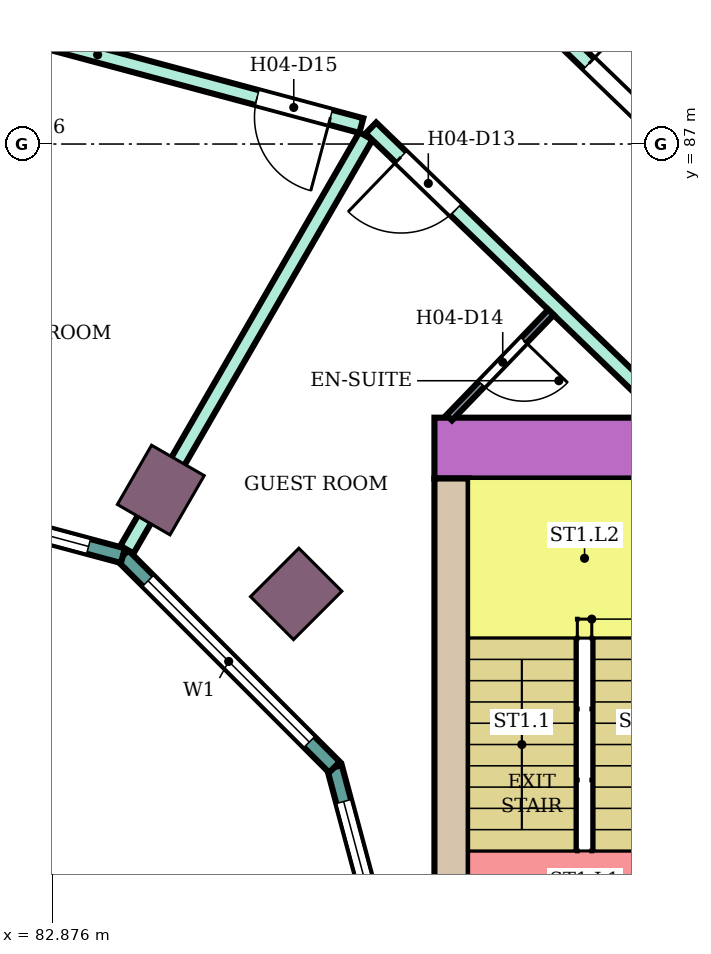
"""IFC4 building model, lengths in metres.
Left out: names, types, materials, properties, quantities, classifications, styles, units other than length and angle.
Written with IfcOpenShell. Run it as: python <this file> out.ifc"""

import sys

from ifc_helpers import new_model, si_unit, direction, frame, frame_2d, origin, origin_2d, place, context, subcontext, project, spatial, rectangle, extrude, element, fill, save


model = new_model("IFC4")
c1 = context("Model", 3, precision=1e-05, world=origin(), true_north=direction((0.0, 1.0)))
c2 = subcontext(c1, "Body", "Model", "MODEL_VIEW")
j1 = project(units=[si_unit("LENGTHUNIT", "METRE"), si_unit("PLANEANGLEUNIT", "RADIAN")], contexts=[c1])
p1 = place(None, origin())
s1 = spatial("IfcSite", under=j1, at=p1, CompositionType="ELEMENT")
p2 = place(p1, origin())
s2 = spatial("IfcBuilding", under=s1, at=p2, CompositionType="ELEMENT")
p3 = place(p2, frame((0.0, 0.0, 66.8)))
s3 = spatial("IfcBuildingStorey", under=s2, at=p3, CompositionType="ELEMENT", Elevation=66.8)
for number, where, z_axis, x_axis in (
    (1, (86.081, 81.081, 0.0), (0.0, 0.0, 1.0), (0.707, 0.707, 0.0)),
    (2, (84.3, 82.448, 0.0), (0.0, 0.0, 1.0), (0.5, 0.866, 0.0)),
):
    element("IfcColumn", number, at=place(p3, frame(where, z_axis=z_axis, x_axis=x_axis)), inside=s3, PredefinedType="COLUMN", context=c2, shape_type="SweptSolid", body=[
        extrude(rectangle(XDim=0.9, YDim=0.8, at=origin_2d()), origin(), (0.0, 0.0, 1.0), 3.8),
    ])
p4 = place(p3, frame((87.9, 83.0, 0.0), z_axis=(0.0, 0.0, 1.0), x_axis=(1.0, 0.0, 0.0)))
e3 = element("IfcWall", 3, at=p4, inside=s3, PredefinedType="SHEAR", context=c2, shape_type="SweptSolid", body=[
    extrude(rectangle(XDim=14.7, YDim=0.8, at=frame_2d((7.35, 0.0))), origin(), (0.0, 0.0, 1.0), 3.48),
])
p5 = place(p4, frame((4.2, 0.0, 0.0)))
e4 = element("IfcOpeningElement", 4, at=p5, cuts=e3, PredefinedType="OPENING", context=c2, shape_type="SweptSolid", body=[
    extrude(rectangle(XDim=2.4, YDim=2.4, at=frame_2d((1.2, 1.2))), frame((0.0, 0.41, 0.0), z_axis=(0.0, -1.0, 0.0), x_axis=(1.0, 0.0, 0.0)), (0.0, 0.0, 1.0), 0.82),
])
p6 = place(p3, frame((88.125, 75.0, 0.0), z_axis=(0.0, 0.0, 1.0), x_axis=(0.0, 1.0, 0.0)))
e5 = element("IfcWall", 5, at=p6, inside=s3, PredefinedType="SHEAR", context=c2, shape_type="SweptSolid", body=[
    extrude(rectangle(XDim=7.6, YDim=0.45, at=frame_2d((3.8, 0.0))), origin(), (0.0, 0.0, 1.0), 3.48),
])
p7 = place(p3, frame((87.604, 75.0, 0.0), z_axis=(0.0, 0.0, 1.0), x_axis=(-0.258789828301, 0.965933654434, 0.0)))
e6 = element("IfcWall", 6, at=p7, inside=s3, PredefinedType="NOTDEFINED", context=c2, shape_type="SweptSolid", body=[
    extrude(rectangle(XDim=3.936, YDim=0.2, at=frame_2d((1.968, 0.0))), origin(), (0.0, 0.0, 1.0), 3.8),
])
p8 = place(p7, frame((0.468, 0.0, 0.9)))
e7 = element("IfcOpeningElement", 7, at=p8, cuts=e6, PredefinedType="OPENING", context=c2, shape_type="SweptSolid", body=[
    extrude(rectangle(XDim=3.0, YDim=2.3, at=frame_2d((1.5, 1.15))), frame((0.0, 0.11, 0.0), z_axis=(0.0, -1.0, 0.0), x_axis=(1.0, 0.0, 0.0)), (0.0, 0.0, 1.0), 0.22),
])
p9 = place(p3, frame((86.585, 78.802, 0.0), z_axis=(0.0, 0.0, 1.0), x_axis=(-0.707106781187, 0.707106781187, 0.0)))
e8 = element("IfcWall", 8, at=p9, inside=s3, PredefinedType="NOTDEFINED", context=c2, shape_type="SweptSolid", body=[
    extrude(rectangle(XDim=3.936, YDim=0.2, at=frame_2d((1.968, 0.0))), origin(), (0.0, 0.0, 1.0), 3.8),
])
p10 = place(p9, frame((0.468, 0.0, 0.9)))
e9 = element("IfcOpeningElement", 9, at=p10, cuts=e8, PredefinedType="OPENING", context=c2, shape_type="SweptSolid", body=[
    extrude(rectangle(XDim=3.0, YDim=2.3, at=frame_2d((1.5, 1.15))), frame((0.0, 0.11, 0.0), z_axis=(0.0, -1.0, 0.0), x_axis=(1.0, 0.0, 0.0)), (0.0, 0.0, 1.0), 0.22),
])
p11 = place(p3, frame((83.802, 81.585, 0.0), z_axis=(0.0, 0.0, 1.0), x_axis=(-0.965933654434, 0.258789828301, 0.0)))
e10 = element("IfcWall", 10, at=p11, inside=s3, PredefinedType="NOTDEFINED", context=c2, shape_type="SweptSolid", body=[
    extrude(rectangle(XDim=3.936, YDim=0.2, at=frame_2d((1.968, 0.0))), origin(), (0.0, 0.0, 1.0), 3.8),
])
p12 = place(p11, frame((0.468, 0.0, 0.9)))
e11 = element("IfcOpeningElement", 11, at=p12, cuts=e10, PredefinedType="OPENING", context=c2, shape_type="SweptSolid", body=[
    extrude(rectangle(XDim=3.0, YDim=2.3, at=frame_2d((1.5, 1.15))), frame((0.0, 0.11, 0.0), z_axis=(0.0, -1.0, 0.0), x_axis=(1.0, 0.0, 0.0)), (0.0, 0.0, 1.0), 0.22),
])
p13 = place(p3, frame((80.0, 89.104, 0.0), z_axis=(0.0, 0.0, 1.0), x_axis=(0.965854247166, -0.25908603442, 0.0)))
e12 = element("IfcWall", 12, at=p13, inside=s3, PredefinedType="PARTITIONING", context=c2, shape_type="SweptSolid", body=[
    extrude(rectangle(XDim=7.183, YDim=0.2, at=frame_2d((3.592, 0.0))), origin(), (0.0, 0.0, 1.0), 3.35),
])
p14 = place(p13, frame((5.763, 0.0, 0.0)))
e13 = element("IfcOpeningElement", 13, at=p14, cuts=e12, PredefinedType="OPENING", context=c2, shape_type="SweptSolid", body=[
    extrude(rectangle(XDim=1.0, YDim=2.1, at=frame_2d((0.5, 1.05))), frame((0.0, 0.11, 0.0), z_axis=(0.0, -1.0, 0.0), x_axis=(1.0, 0.0, 0.0)), (0.0, 0.0, 1.0), 0.22),
])
p15 = place(p3, frame((83.854, 81.664, 0.0), z_axis=(0.0, 0.0, 1.0), x_axis=(0.500224530691, 0.865895732115, 0.0)))
e14 = element("IfcWall", 14, at=p15, inside=s3, PredefinedType="PARTITIONING", context=c2, shape_type="SweptSolid", body=[
    extrude(rectangle(XDim=6.285, YDim=0.2, at=frame_2d((3.143, 0.0))), origin(), (0.0, 0.0, 1.0), 3.35),
])
p16 = place(p3, frame((87.064, 87.211, 0.0), z_axis=(0.0, 0.0, 1.0), x_axis=(0.719540958932, -0.694450004262, 0.0)))
e15 = element("IfcWall", 15, at=p16, inside=s3, PredefinedType="PARTITIONING", context=c2, shape_type="SweptSolid", body=[
    extrude(rectangle(XDim=5.488, YDim=0.2, at=frame_2d((2.744, 0.0))), origin(), (0.0, 0.0, 1.0), 3.35),
])
p17 = place(p16, frame((0.55, 0.0, 0.0)))
e16 = element("IfcOpeningElement", 16, at=p17, cuts=e15, PredefinedType="OPENING", context=c2, shape_type="SweptSolid", body=[
    extrude(rectangle(XDim=1.0, YDim=2.1, at=frame_2d((0.5, 1.05))), frame((0.0, 0.11, 0.0), z_axis=(0.0, -1.0, 0.0), x_axis=(1.0, 0.0, 0.0)), (0.0, 0.0, 1.0), 0.22),
])
p18 = place(p3, frame((88.386, 89.549, 0.0), z_axis=(0.0, 0.0, 1.0), x_axis=(0.719560576741, -0.694429677073, 0.0)))
e17 = element("IfcWall", 17, at=p18, inside=s3, PredefinedType="PARTITIONING", context=c2, shape_type="SweptSolid", body=[
    extrude(rectangle(XDim=6.635, YDim=0.2, at=frame_2d((3.318, 0.0))), origin(), (0.0, 0.0, 1.0), 3.35),
])
p19 = place(p18, frame((2.147, 0.0, 0.0)))
e18 = element("IfcOpeningElement", 18, at=p19, cuts=e17, PredefinedType="OPENING", context=c2, shape_type="SweptSolid", body=[
    extrude(rectangle(XDim=1.8, YDim=2.1, at=frame_2d((0.9, 1.05))), frame((0.0, 0.11, 0.0), z_axis=(0.0, -1.0, 0.0), x_axis=(1.0, 0.0, 0.0)), (0.0, 0.0, 1.0), 0.22),
])
p20 = place(p3, frame((88.095, 83.4, 0.0), z_axis=(0.0, 0.0, 1.0), x_axis=(0.694447472534, 0.719543402368, 0.0)))
e19 = element("IfcWall", 19, at=p20, inside=s3, PredefinedType="PARTITIONING", context=c2, shape_type="SweptSolid", body=[
    extrude(rectangle(XDim=1.926, YDim=0.1, at=frame_2d((0.963, 0.0))), origin(), (0.0, 0.0, 1.0), 3.35),
])
p21 = place(p20, frame((0.613, 0.0, 0.0)))
e20 = element("IfcOpeningElement", 20, at=p21, cuts=e19, PredefinedType="OPENING", context=c2, shape_type="SweptSolid", body=[
    extrude(rectangle(XDim=0.8, YDim=2.1, at=frame_2d((0.4, 1.05))), frame((0.0, 0.06, 0.0), z_axis=(0.0, -1.0, 0.0), x_axis=(1.0, 0.0, 0.0)), (0.0, 0.0, 1.0), 0.12),
])
p22 = place(p8, origin())
e21 = element("IfcWindow", 21, at=p22, inside=s3, PartitioningType="SINGLE_PANEL", PredefinedType="WINDOW", context=c2, shape_type="SweptSolid", body=[
    extrude(rectangle(XDim=3.0, YDim=2.3, at=frame_2d((1.5, 1.15))), frame((0.0, 0.03, 0.0), z_axis=(0.0, -1.0, 0.0), x_axis=(1.0, 0.0, 0.0)), (0.0, 0.0, 1.0), 0.06),
])
fill(e7, e21)
p23 = place(p10, origin())
e22 = element("IfcWindow", 22, at=p23, inside=s3, PartitioningType="SINGLE_PANEL", PredefinedType="WINDOW", context=c2, shape_type="SweptSolid", body=[
    extrude(rectangle(XDim=3.0, YDim=2.3, at=frame_2d((1.5, 1.15))), frame((0.0, 0.03, 0.0), z_axis=(0.0, -1.0, 0.0), x_axis=(1.0, 0.0, 0.0)), (0.0, 0.0, 1.0), 0.06),
])
fill(e9, e22)
p24 = place(p12, origin())
e23 = element("IfcWindow", 23, at=p24, inside=s3, PartitioningType="SINGLE_PANEL", PredefinedType="WINDOW", context=c2, shape_type="SweptSolid", body=[
    extrude(rectangle(XDim=3.0, YDim=2.3, at=frame_2d((1.5, 1.15))), frame((0.0, 0.03, 0.0), z_axis=(0.0, -1.0, 0.0), x_axis=(1.0, 0.0, 0.0)), (0.0, 0.0, 1.0), 0.06),
])
fill(e11, e23)
p25 = place(p19, origin())
e24 = element("IfcDoor", 24, at=p25, inside=s3, OperationType="DOUBLE_DOOR_SINGLE_SWING", PredefinedType="DOOR", context=c2, shape_type="SweptSolid", body=[
    extrude(rectangle(XDim=1.8, YDim=2.1, at=frame_2d((0.9, 1.05))), frame((0.0, 0.025, 0.0), z_axis=(0.0, -1.0, 0.0), x_axis=(1.0, 0.0, 0.0)), (0.0, 0.0, 1.0), 0.05),
])
fill(e18, e24)
p26 = place(p17, frame((1.0, 0.0, 0.0), z_axis=(0.0, 0.0, 1.0), x_axis=(-1.0, 0.0, 0.0)))
e25 = element("IfcDoor", 25, at=p26, inside=s3, OperationType="SINGLE_SWING_RIGHT", PredefinedType="DOOR", context=c2, shape_type="SweptSolid", body=[
    extrude(rectangle(XDim=1.0, YDim=2.1, at=frame_2d((0.5, 1.05))), frame((0.0, 0.025, 0.0), z_axis=(0.0, -1.0, 0.0), x_axis=(1.0, 0.0, 0.0)), (0.0, 0.0, 1.0), 0.05),
])
fill(e16, e25)
p27 = place(p21, frame((0.8, 0.0, 0.0), z_axis=(0.0, 0.0, 1.0), x_axis=(-1.0, 0.0, 0.0)))
e26 = element("IfcDoor", 26, at=p27, inside=s3, OperationType="SINGLE_SWING_LEFT", PredefinedType="DOOR", context=c2, shape_type="SweptSolid", body=[
    extrude(rectangle(XDim=0.8, YDim=2.1, at=frame_2d((0.4, 1.05))), frame((0.0, 0.025, 0.0), z_axis=(0.0, -1.0, 0.0), x_axis=(1.0, 0.0, 0.0)), (0.0, 0.0, 1.0), 0.05),
])
fill(e20, e26)
p28 = place(p14, frame((1.0, 0.0, 0.0), z_axis=(0.0, 0.0, 1.0), x_axis=(-1.0, 0.0, 0.0)))
e27 = element("IfcDoor", 27, at=p28, inside=s3, OperationType="SINGLE_SWING_LEFT", PredefinedType="DOOR", context=c2, shape_type="SweptSolid", body=[
    extrude(rectangle(XDim=1.0, YDim=2.1, at=frame_2d((0.5, 1.05))), frame((0.0, 0.025, 0.0), z_axis=(0.0, -1.0, 0.0), x_axis=(1.0, 0.0, 0.0)), (0.0, 0.0, 1.0), 0.05),
])
fill(e13, e27)
save(model, sys.argv[1])
